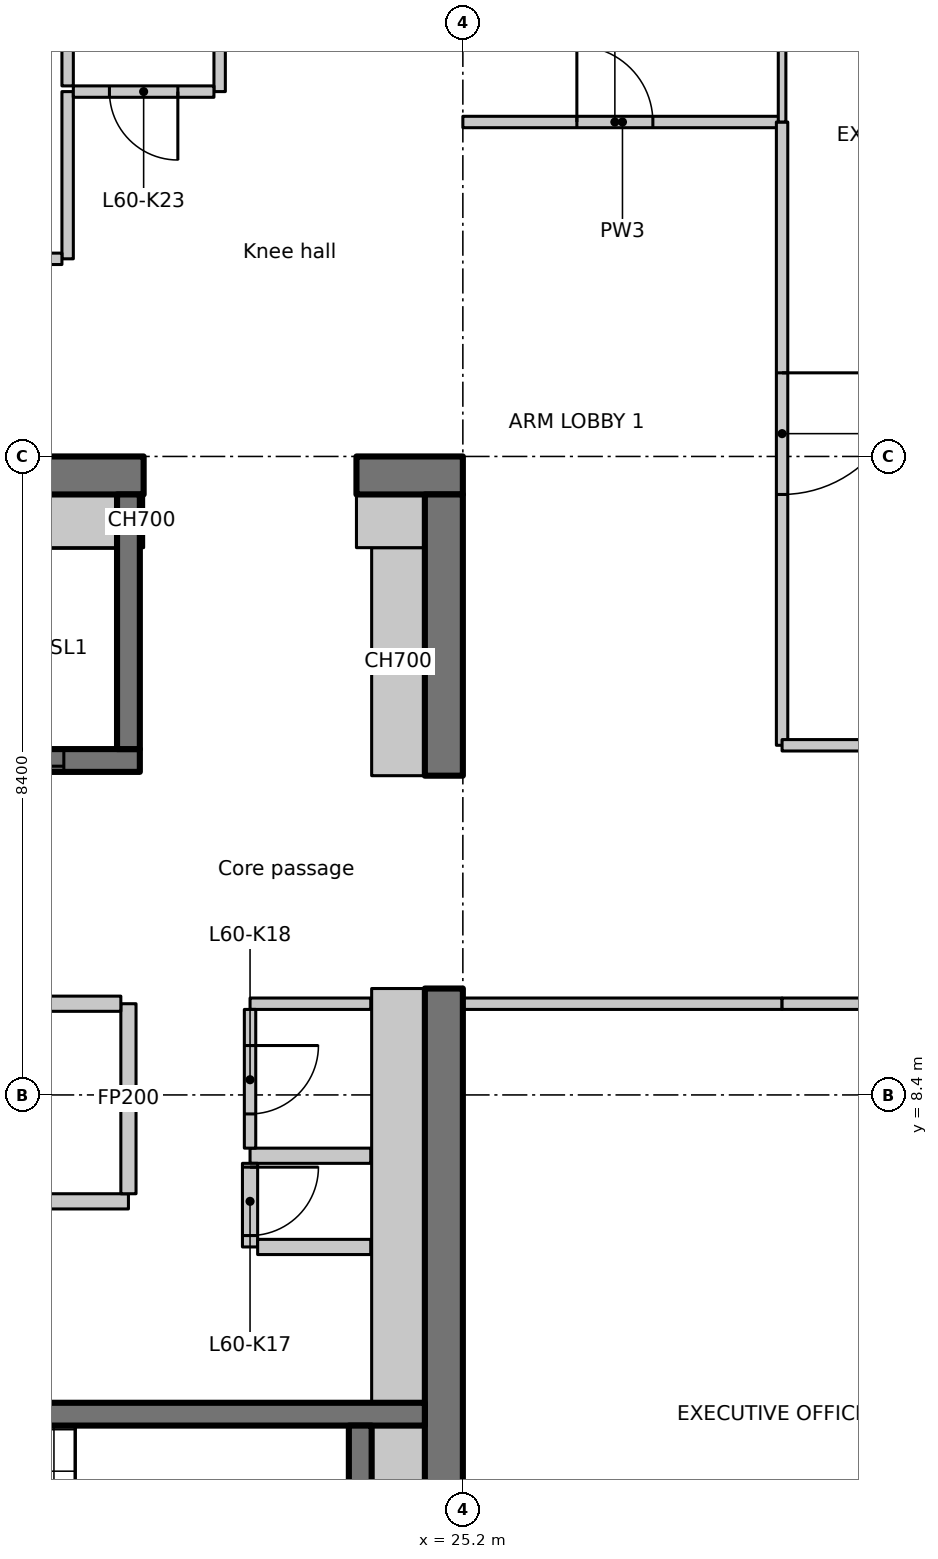
"""IFC4 building model, lengths in metres.
Left out: names, types, materials, properties, quantities, classifications, styles, units other than length and angle.
Written with IfcOpenShell. Run it as: python <this file> out.ifc"""

import sys

from ifc_helpers import new_model, si_unit, direction, frame, frame_2d, origin, place, context, subcontext, project, spatial, polyline, rectangle, outline, extrude, element, fill, save


model = new_model("IFC4")
c1 = context("Model", 3, precision=1e-05, world=origin(), true_north=direction((0.0, 1.0)))
c2 = subcontext(c1, "Body", "Model", "MODEL_VIEW")
j1 = project(units=[si_unit("LENGTHUNIT", "METRE"), si_unit("PLANEANGLEUNIT", "RADIAN")], contexts=[c1])
p1 = place(None, origin())
s1 = spatial("IfcSite", under=j1, at=p1, CompositionType="ELEMENT")
p2 = place(p1, origin())
s2 = spatial("IfcBuilding", under=s1, at=p2, CompositionType="ELEMENT")
p3 = place(p2, frame((0.0, 0.0, 237.3)))
s3 = spatial("IfcBuildingStorey", under=s2, at=p3, CompositionType="ELEMENT", Elevation=237.3)
p4 = place(p3, frame((-1.1, 16.55, 0.0), z_axis=(0.0, 0.0, 1.0), x_axis=(1.0, 0.0, 0.0)))
e1 = element("IfcWall", 1, at=p4, inside=s3, PredefinedType="SHEAR", context=c2, shape_type="SweptSolid", body=[
    extrude(rectangle(XDim=22.1, YDim=0.5, at=frame_2d((11.05, 0.0))), origin(), (0.0, 0.0, 1.0), 3.35),
])
p5 = place(p4, frame((3.15, 0.0, 0.0)))
e2 = element("IfcOpeningElement", 2, at=p5, cuts=e1, PredefinedType="OPENING", context=c2, shape_type="SweptSolid", body=[
    extrude(rectangle(XDim=1.1, YDim=2.3, at=frame_2d((0.55, 1.15))), frame((0.0, 0.26, 0.0), z_axis=(0.0, -1.0, 0.0), x_axis=(1.0, 0.0, 0.0)), (0.0, 0.0, 1.0), 0.52),
])
p6 = place(p3, frame((23.8, 16.55, 0.0), z_axis=(0.0, 0.0, 1.0), x_axis=(1.0, 0.0, 0.0)))
e3 = element("IfcWall", 3, at=p6, inside=s3, PredefinedType="SHEAR", context=c2, shape_type="SweptSolid", body=[
    extrude(rectangle(XDim=1.4, YDim=0.5, at=frame_2d((0.7, 0.0))), origin(), (0.0, 0.0, 1.0), 3.35),
])
p7 = place(p3, frame((24.95, 0.5, 0.0), z_axis=(0.0, 0.0, 1.0), x_axis=(0.0, 1.0, 0.0)))
e4 = element("IfcWall", 4, at=p7, inside=s3, PredefinedType="SHEAR", context=c2, shape_type="SweptSolid", body=[
    extrude(rectangle(XDim=9.3, YDim=0.5, at=frame_2d((4.65, 0.0))), origin(), (0.0, 0.0, 1.0), 3.35),
])
p8 = place(p3, frame((24.95, 12.6, 0.0), z_axis=(0.0, 0.0, 1.0), x_axis=(0.0, 1.0, 0.0)))
e5 = element("IfcWall", 5, at=p8, inside=s3, PredefinedType="SHEAR", context=c2, shape_type="SweptSolid", body=[
    extrude(rectangle(XDim=3.7, YDim=0.5, at=frame_2d((1.85, 0.0))), origin(), (0.0, 0.0, 1.0), 3.35),
])
p9 = place(p3, frame((24.35, 12.6, 0.0), z_axis=(0.0, 0.0, 1.0), x_axis=(0.0, 1.0, 0.0)))
e6 = element("IfcWall", 6, at=p9, inside=s3, PredefinedType="PARTITIONING", context=c2, shape_type="SweptSolid", body=[
    extrude(rectangle(XDim=3.0, YDim=0.7, at=frame_2d((1.5, 0.0))), origin(), (0.0, 0.0, 1.0), 3.35),
])
p10 = place(p3, frame((23.8, 15.95, 0.0), z_axis=(0.0, 0.0, 1.0), x_axis=(1.0, 0.0, 0.0)))
e7 = element("IfcWall", 7, at=p10, inside=s3, PredefinedType="PARTITIONING", context=c2, shape_type="SweptSolid", body=[
    extrude(rectangle(XDim=0.9, YDim=0.7, at=frame_2d((0.45, 0.0))), origin(), (0.0, 0.0, 1.0), 3.35),
])
p11 = place(p3, frame((17.85, 12.8, 0.0), z_axis=(0.0, 0.0, 1.0), x_axis=(1.0, 0.0, 0.0)))
e8 = element("IfcWall", 8, at=p11, inside=s3, PredefinedType="SHEAR", context=c2, shape_type="SweptSolid", body=[
    extrude(rectangle(XDim=3.1, YDim=0.3, at=frame_2d((1.55, 0.0))), origin(), (0.0, 0.0, 1.0), 3.35),
])
p12 = place(p11, frame((1.0, 0.0, 0.0)))
e9 = element("IfcOpeningElement", 9, at=p12, cuts=e8, PredefinedType="OPENING", context=c2, shape_type="SweptSolid", body=[
    extrude(rectangle(XDim=1.1, YDim=2.3, at=frame_2d((0.55, 1.15))), frame((0.0, 0.16, 0.0), z_axis=(0.0, -1.0, 0.0), x_axis=(1.0, 0.0, 0.0)), (0.0, 0.0, 1.0), 0.32),
])
p13 = place(p3, frame((20.8, 12.95, 0.0), z_axis=(0.0, 0.0, 1.0), x_axis=(0.0, 1.0, 0.0)))
e10 = element("IfcWall", 10, at=p13, inside=s3, PredefinedType="SHEAR", context=c2, shape_type="SweptSolid", body=[
    extrude(rectangle(XDim=3.35, YDim=0.3, at=frame_2d((1.675, 0.0))), origin(), (0.0, 0.0, 1.0), 3.35),
])
p14 = place(p3, frame((15.8, 4.2, 0.0), z_axis=(0.0, 0.0, 1.0), x_axis=(1.0, 0.0, 0.0)))
e11 = element("IfcWall", 11, at=p14, inside=s3, PredefinedType="SHEAR", context=c2, shape_type="SweptSolid", body=[
    extrude(rectangle(XDim=8.9, YDim=0.3, at=frame_2d((4.45, 0.0))), origin(), (0.0, 0.0, 1.0), 3.35),
])
p15 = place(p14, frame((0.4, 0.0, 0.0)))
e12 = element("IfcOpeningElement", 12, at=p15, cuts=e11, PredefinedType="OPENING", context=c2, shape_type="SweptSolid", body=[
    extrude(rectangle(XDim=1.0, YDim=2.1, at=frame_2d((0.5, 1.05))), frame((0.0, 0.16, 0.0), z_axis=(0.0, -1.0, 0.0), x_axis=(1.0, 0.0, 0.0)), (0.0, 0.0, 1.0), 0.32),
])
p16 = place(p3, frame((23.85, 1.5, 0.0), z_axis=(0.0, 0.0, 1.0), x_axis=(0.0, 1.0, 0.0)))
e13 = element("IfcWall", 13, at=p16, inside=s3, PredefinedType="SHEAR", context=c2, shape_type="SweptSolid", body=[
    extrude(rectangle(XDim=2.55, YDim=0.3, at=frame_2d((1.275, 0.0))), origin(), (0.0, 0.0, 1.0), 3.35),
])
p17 = place(p3, frame((12.4, 7.0, 0.0), z_axis=(0.0, 0.0, 1.0), x_axis=(1.0, 0.0, 0.0)))
e14 = element("IfcWall", 14, at=p17, inside=s3, PredefinedType="PARTITIONING", context=c2, shape_type="SweptSolid", body=[
    extrude(rectangle(XDim=8.4, YDim=0.2, at=frame_2d((4.2, 0.0))), origin(), (0.0, 0.0, 1.0), 3.35),
])
p18 = place(p3, frame((20.8, 7.1, 0.0), z_axis=(0.0, 0.0, 1.0), x_axis=(0.0, 1.0, 0.0)))
e15 = element("IfcWall", 15, at=p18, inside=s3, PredefinedType="PARTITIONING", context=c2, shape_type="SweptSolid", body=[
    extrude(rectangle(XDim=2.5, YDim=0.2, at=frame_2d((1.25, 0.0))), origin(), (0.0, 0.0, 1.0), 3.35),
])
p19 = place(p3, frame((20.7, 9.6, 0.0), z_axis=(0.0, 0.0, 1.0), x_axis=(-1.0, 0.0, 0.0)))
e16 = element("IfcWall", 16, at=p19, inside=s3, PredefinedType="PARTITIONING", context=c2, shape_type="SweptSolid", body=[
    extrude(rectangle(XDim=8.3, YDim=0.2, at=frame_2d((4.15, 0.0))), origin(), (0.0, 0.0, 1.0), 3.35),
])
p20 = place(p19, frame((3.65, 0.0, 0.0)))
e17 = element("IfcOpeningElement", 17, at=p20, cuts=e16, PredefinedType="OPENING", context=c2, shape_type="SweptSolid", body=[
    extrude(rectangle(XDim=0.9, YDim=2.1, at=frame_2d((0.45, 1.05))), frame((0.0, 0.11, 0.0), z_axis=(0.0, -1.0, 0.0), x_axis=(1.0, 0.0, 0.0)), (0.0, 0.0, 1.0), 0.22),
])
p21 = place(p3, frame((23.988, 7.6, 0.0), z_axis=(0.0, 0.0, 1.0), x_axis=(-1.0, 0.0, 0.0)))
e18 = element("IfcWall", 18, at=p21, inside=s3, PredefinedType="PARTITIONING", context=c2, shape_type="SweptSolid", body=[
    extrude(rectangle(XDim=1.588, YDim=0.2, at=frame_2d((0.794, 0.0))), origin(), (0.0, 0.0, 1.0), 3.35),
])
p22 = place(p3, frame((22.4, 7.5, 0.0), z_axis=(0.0, 0.0, 1.0), x_axis=(0.0, -1.0, 0.0)))
e19 = element("IfcWall", 19, at=p22, inside=s3, PredefinedType="PARTITIONING", context=c2, shape_type="SweptSolid", body=[
    extrude(rectangle(XDim=1.1, YDim=0.2, at=frame_2d((0.55, 0.0))), origin(), (0.0, 0.0, 1.0), 3.35),
])
p23 = place(p22, frame((0.05, 0.0, 0.0)))
e20 = element("IfcOpeningElement", 20, at=p23, cuts=e19, PredefinedType="OPENING", context=c2, shape_type="SweptSolid", body=[
    extrude(rectangle(XDim=0.9, YDim=2.1, at=frame_2d((0.45, 1.05))), frame((0.0, 0.11, 0.0), z_axis=(0.0, -1.0, 0.0), x_axis=(1.0, 0.0, 0.0)), (0.0, 0.0, 1.0), 0.22),
])
p24 = place(p3, frame((22.5, 6.4, 0.0), z_axis=(0.0, 0.0, 1.0), x_axis=(1.0, 0.0, 0.0)))
e21 = element("IfcWall", 21, at=p24, inside=s3, PredefinedType="PARTITIONING", context=c2, shape_type="SweptSolid", body=[
    extrude(rectangle(XDim=1.488, YDim=0.2, at=frame_2d((0.744, 0.0))), origin(), (0.0, 0.0, 1.0), 3.35),
])
p25 = place(p3, frame((20.0, 21.6, 0.0), z_axis=(0.0, 0.0, 1.0), x_axis=(0.0, -1.0, 0.0)))
e22 = element("IfcWall", 22, at=p25, inside=s3, PredefinedType="PARTITIONING", context=c2, shape_type="SweptSolid", body=[
    extrude(rectangle(XDim=2.2, YDim=0.15, at=frame_2d((1.1, 0.0))), origin(), (0.0, 0.0, 1.0), 3.35),
])
p26 = place(p3, frame((19.925, 19.4, 0.0), z_axis=(0.0, 0.0, 1.0), x_axis=(-1.0, 0.0, 0.0)))
e23 = element("IfcWall", 23, at=p26, inside=s3, PredefinedType="PARTITIONING", context=c2, shape_type="SweptSolid", body=[
    extrude(rectangle(XDim=5.725, YDim=0.15, at=frame_2d((2.863, 0.0))), origin(), (0.0, 0.0, 1.0), 3.35),
])
p27 = place(p26, frame((2.325, 0.0, 0.0)))
e24 = element("IfcOpeningElement", 24, at=p27, cuts=e23, PredefinedType="OPENING", context=c2, shape_type="SweptSolid", body=[
    extrude(rectangle(XDim=1.0, YDim=2.1, at=frame_2d((0.5, 1.05))), frame((0.0, 0.085, 0.0), z_axis=(0.0, -1.0, 0.0), x_axis=(1.0, 0.0, 0.0)), (0.0, 0.0, 1.0), 0.17),
])
p28 = place(p3, frame((22.0, 23.925, 0.0), z_axis=(0.0, 0.0, 1.0), x_axis=(0.0, -1.0, 0.0)))
e25 = element("IfcWall", 25, at=p28, inside=s3, PredefinedType="PARTITIONING", context=c2, shape_type="SweptSolid", body=[
    extrude(rectangle(XDim=2.325, YDim=0.15, at=frame_2d((1.163, 0.0))), origin(), (0.0, 0.0, 1.0), 3.35),
])
p29 = place(p3, frame((21.925, 21.6, 0.0), z_axis=(0.0, 0.0, 1.0), x_axis=(-1.0, 0.0, 0.0)))
e26 = element("IfcWall", 26, at=p29, inside=s3, PredefinedType="PARTITIONING", context=c2, shape_type="SweptSolid", body=[
    extrude(rectangle(XDim=1.85, YDim=0.15, at=frame_2d((0.925, 0.0))), origin(), (0.0, 0.0, 1.0), 3.35),
])
p30 = place(p29, frame((0.475, 0.0, 0.0)))
e27 = element("IfcOpeningElement", 27, at=p30, cuts=e26, PredefinedType="OPENING", context=c2, shape_type="SweptSolid", body=[
    extrude(rectangle(XDim=0.9, YDim=2.1, at=frame_2d((0.45, 1.05))), frame((0.0, 0.085, 0.0), z_axis=(0.0, -1.0, 0.0), x_axis=(1.0, 0.0, 0.0)), (0.0, 0.0, 1.0), 0.17),
])
p31 = place(p3, frame((20.0, 21.675, 0.0), z_axis=(0.0, 0.0, 1.0), x_axis=(0.0, 1.0, 0.0)))
e28 = element("IfcWall", 28, at=p31, inside=s3, PredefinedType="PARTITIONING", context=c2, shape_type="SweptSolid", body=[
    extrude(rectangle(XDim=2.15, YDim=0.15, at=frame_2d((1.075, 0.0))), origin(), (0.0, 0.0, 1.0), 3.35),
])
p32 = place(p3, frame((23.988, 9.6, 0.0), z_axis=(0.0, 0.0, 1.0), x_axis=(-1.0, 0.0, 0.0)))
e29 = element("IfcWall", 29, at=p32, inside=s3, PredefinedType="PARTITIONING", context=c2, shape_type="SweptSolid", body=[
    extrude(rectangle(XDim=1.588, YDim=0.15, at=frame_2d((0.794, 0.0))), origin(), (0.0, 0.0, 1.0), 3.35),
])
p33 = place(p3, frame((22.4, 9.525, 0.0), z_axis=(0.0, 0.0, 1.0), x_axis=(0.0, -1.0, 0.0)))
e30 = element("IfcWall", 30, at=p33, inside=s3, PredefinedType="PARTITIONING", context=c2, shape_type="SweptSolid", body=[
    extrude(rectangle(XDim=1.825, YDim=0.15, at=frame_2d((0.913, 0.0))), origin(), (0.0, 0.0, 1.0), 3.35),
])
p34 = place(p33, frame((0.475, 0.0, 0.0)))
e31 = element("IfcOpeningElement", 31, at=p34, cuts=e30, PredefinedType="OPENING", context=c2, shape_type="SweptSolid", body=[
    extrude(rectangle(XDim=0.9, YDim=2.1, at=frame_2d((0.45, 1.05))), frame((0.0, 0.085, 0.0), z_axis=(0.0, -1.0, 0.0), x_axis=(1.0, 0.0, 0.0)), (0.0, 0.0, 1.0), 0.17),
])
p35 = place(p3, frame((18.15, 15.95, 0.0), z_axis=(0.0, 0.0, 1.0), x_axis=(1.0, 0.0, 0.0)))
e32 = element("IfcWall", 32, at=p35, inside=s3, PredefinedType="PARTITIONING", context=c2, shape_type="SweptSolid", body=[
    extrude(rectangle(XDim=2.5, YDim=0.7, at=frame_2d((1.25, 0.0))), origin(), (0.0, 0.0, 1.0), 3.35),
])
p36 = place(p3, frame((20.95, 15.95, 0.0), z_axis=(0.0, 0.0, 1.0), x_axis=(1.0, 0.0, 0.0)))
e33 = element("IfcWall", 33, at=p36, inside=s3, PredefinedType="PARTITIONING", context=c2, shape_type="SweptSolid", body=[
    extrude(rectangle(XDim=0.05, YDim=0.7, at=frame_2d((0.025, 0.0))), origin(), (0.0, 0.0, 1.0), 3.35),
])
p37 = place(p3, frame((24.35, 1.5, 0.0), z_axis=(0.0, 0.0, 1.0), x_axis=(0.0, 1.0, 0.0)))
e34 = element("IfcWall", 34, at=p37, inside=s3, PredefinedType="PARTITIONING", context=c2, shape_type="SweptSolid", body=[
    extrude(rectangle(XDim=2.55, YDim=0.7, at=frame_2d((1.275, 0.0))), origin(), (0.0, 0.0, 1.0), 3.35),
])
p38 = place(p3, frame((24.35, 4.35, 0.0), z_axis=(0.0, 0.0, 1.0), x_axis=(0.0, 1.0, 0.0)))
e35 = element("IfcWall", 35, at=p38, inside=s3, PredefinedType="PARTITIONING", context=c2, shape_type="SweptSolid", body=[
    extrude(rectangle(XDim=5.45, YDim=0.7, at=frame_2d((2.725, 0.0))), origin(), (0.0, 0.0, 1.0), 3.35),
])
p39 = place(p3, frame((25.2, 21.2, 0.0), z_axis=(0.0, 0.0, 1.0), x_axis=(1.0, 0.0, 0.0)))
e36 = element("IfcWall", 36, at=p39, inside=s3, PredefinedType="PARTITIONING", context=c2, shape_type="SweptSolid", body=[
    extrude(rectangle(XDim=4.2, YDim=0.15, at=frame_2d((2.1, 0.0))), origin(), (0.0, 0.0, 1.0), 3.33),
])
p40 = place(p39, frame((1.5, 0.0, 0.0)))
e37 = element("IfcOpeningElement", 37, at=p40, cuts=e36, PredefinedType="OPENING", context=c2, shape_type="SweptSolid", body=[
    extrude(rectangle(XDim=1.0, YDim=2.1, at=frame_2d((0.5, 1.05))), frame((0.0, 0.085, 0.0), z_axis=(0.0, -1.0, 0.0), x_axis=(1.0, 0.0, 0.0)), (0.0, 0.0, 1.0), 0.17),
])
p41 = place(p3, frame((29.4, 9.6, 0.0), z_axis=(0.0, 0.0, 1.0), x_axis=(-1.0, 0.0, 0.0)))
e38 = element("IfcWall", 38, at=p41, inside=s3, PredefinedType="PARTITIONING", context=c2, shape_type="SweptSolid", body=[
    extrude(rectangle(XDim=4.2, YDim=0.15, at=frame_2d((2.1, 0.0))), origin(), (0.0, 0.0, 1.0), 3.33),
])
p42 = place(p3, frame((29.4, 21.2, 0.0), z_axis=(0.0, 0.0, 1.0), x_axis=(0.0, -1.0, 0.0)))
e39 = element("IfcWall", 39, at=p42, inside=s3, PredefinedType="PARTITIONING", context=c2, shape_type="SweptSolid", body=[
    extrude(rectangle(XDim=8.2, YDim=0.15, at=frame_2d((4.1, 0.0))), origin(), (0.0, 0.0, 1.0), 3.33),
])
p43 = place(p42, frame((3.3, 0.0, 0.0)))
e40 = element("IfcOpeningElement", 40, at=p43, cuts=e39, PredefinedType="OPENING", context=c2, shape_type="SweptSolid", body=[
    extrude(rectangle(XDim=1.6, YDim=2.1, at=frame_2d((0.8, 1.05))), frame((0.0, 0.085, 0.0), z_axis=(0.0, -1.0, 0.0), x_axis=(1.0, 0.0, 0.0)), (0.0, 0.0, 1.0), 0.17),
])
p44 = place(p3, frame((29.4, 27.429, 0.0), z_axis=(0.0, 0.0, 1.0), x_axis=(0.0, -1.0, 0.0)))
e41 = element("IfcWall", 41, at=p44, inside=s3, PredefinedType="PARTITIONING", context=c2, shape_type="SweptSolid", body=[
    extrude(outline(polyline([(0.0, 0.0), (6.229, 0.0), (6.229, 3.33), (2.679, 3.33), (2.677, 2.98), (1.781, 2.98), (1.779, 3.33), (0.154, 3.33), (0.0, 3.33), (0.0, 0.0)])), frame((0.0, 0.05, 0.0), z_axis=(0.0, -1.0, 0.0), x_axis=(1.0, 0.0, 0.0)), (0.0, 0.0, 1.0), 0.1),
])
p45 = place(p3, frame((33.6, 9.6, 0.0), z_axis=(0.0, 0.0, 1.0), x_axis=(-1.0, 0.0, 0.0)))
e42 = element("IfcWall", 42, at=p45, inside=s3, PredefinedType="PARTITIONING", context=c2, shape_type="SweptSolid", body=[
    extrude(rectangle(XDim=4.2, YDim=0.15, at=frame_2d((2.1, 0.0))), origin(), (0.0, 0.0, 1.0), 3.33),
])
p46 = place(p45, frame((1.2, 0.0, 0.0)))
e43 = element("IfcOpeningElement", 43, at=p46, cuts=e42, PredefinedType="OPENING", context=c2, shape_type="SweptSolid", body=[
    extrude(rectangle(XDim=1.6, YDim=2.1, at=frame_2d((0.8, 1.05))), frame((0.0, 0.085, 0.0), z_axis=(0.0, -1.0, 0.0), x_axis=(1.0, 0.0, 0.0)), (0.0, 0.0, 1.0), 0.17),
])
p47 = place(p3, frame((29.4, 13.0, 0.0), z_axis=(0.0, 0.0, 1.0), x_axis=(1.0, 0.0, 0.0)))
e44 = element("IfcWall", 44, at=p47, inside=s3, PredefinedType="PARTITIONING", context=c2, shape_type="SweptSolid", body=[
    extrude(rectangle(XDim=4.2, YDim=0.15, at=frame_2d((2.1, 0.0))), origin(), (0.0, 0.0, 1.0), 3.33),
])
p48 = place(p12, origin())
e45 = element("IfcDoor", 45, at=p48, inside=s3, OperationType="SLIDING_TO_LEFT", PredefinedType="DOOR", context=c2, shape_type="SweptSolid", body=[
    extrude(rectangle(XDim=1.1, YDim=2.3, at=frame_2d((0.55, 1.15))), frame((0.0, 0.025, 0.0), z_axis=(0.0, -1.0, 0.0), x_axis=(1.0, 0.0, 0.0)), (0.0, 0.0, 1.0), 0.05),
])
fill(e9, e45)
p49 = place(p23, origin())
e46 = element("IfcDoor", 46, at=p49, inside=s3, OperationType="SINGLE_SWING_RIGHT", PredefinedType="DOOR", context=c2, shape_type="SweptSolid", body=[
    extrude(rectangle(XDim=0.9, YDim=2.1, at=frame_2d((0.45, 1.05))), frame((0.0, 0.025, 0.0), z_axis=(0.0, -1.0, 0.0), x_axis=(1.0, 0.0, 0.0)), (0.0, 0.0, 1.0), 0.05),
])
fill(e20, e46)
p50 = place(p34, origin())
e47 = element("IfcDoor", 47, at=p50, inside=s3, OperationType="SINGLE_SWING_LEFT", PredefinedType="DOOR", context=c2, shape_type="SweptSolid", body=[
    extrude(rectangle(XDim=0.9, YDim=2.1, at=frame_2d((0.45, 1.05))), frame((0.0, 0.025, 0.0), z_axis=(0.0, -1.0, 0.0), x_axis=(1.0, 0.0, 0.0)), (0.0, 0.0, 1.0), 0.05),
])
fill(e31, e47)
p51 = place(p30, origin())
e48 = element("IfcDoor", 48, at=p51, inside=s3, OperationType="SINGLE_SWING_RIGHT", PredefinedType="DOOR", context=c2, shape_type="SweptSolid", body=[
    extrude(rectangle(XDim=0.9, YDim=2.1, at=frame_2d((0.45, 1.05))), frame((0.0, 0.025, 0.0), z_axis=(0.0, -1.0, 0.0), x_axis=(1.0, 0.0, 0.0)), (0.0, 0.0, 1.0), 0.05),
])
fill(e27, e48)
p52 = place(p40, origin())
e49 = element("IfcDoor", 49, at=p52, inside=s3, OperationType="SINGLE_SWING_LEFT", PredefinedType="DOOR", context=c2, shape_type="SweptSolid", body=[
    extrude(rectangle(XDim=1.0, YDim=2.1, at=frame_2d((0.5, 1.05))), frame((0.0, 0.025, 0.0), z_axis=(0.0, -1.0, 0.0), x_axis=(1.0, 0.0, 0.0)), (0.0, 0.0, 1.0), 0.05),
])
fill(e37, e49)
p53 = place(p43, origin())
e50 = element("IfcDoor", 50, at=p53, inside=s3, OperationType="DOUBLE_DOOR_SINGLE_SWING", PredefinedType="DOOR", context=c2, shape_type="SweptSolid", body=[
    extrude(rectangle(XDim=1.6, YDim=2.1, at=frame_2d((0.8, 1.05))), frame((0.0, 0.025, 0.0), z_axis=(0.0, -1.0, 0.0), x_axis=(1.0, 0.0, 0.0)), (0.0, 0.0, 1.0), 0.05),
])
fill(e40, e50)
save(model, sys.argv[1])
